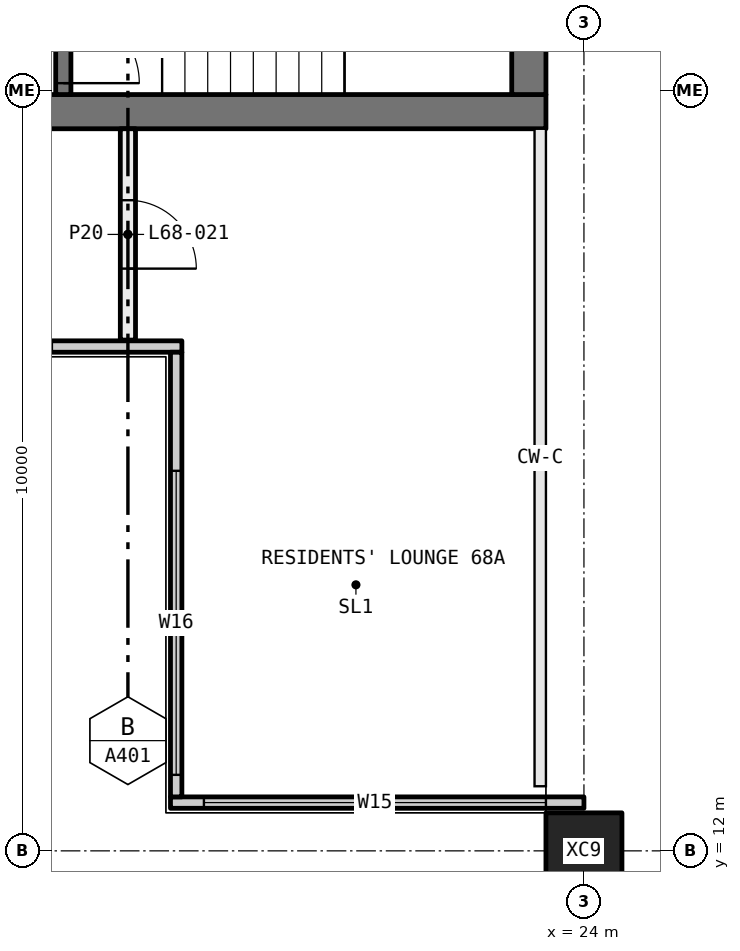
"""IFC4 building model, lengths in metres.
Left out: names, types, materials, properties, quantities, classifications, styles, units other than length and angle.
Written with IfcOpenShell. Run it as: python <this file> out.ifc"""

import sys

from ifc_helpers import new_model, si_unit, direction, frame, frame_2d, origin, origin_2d, place, context, subcontext, project, spatial, rectangle, hollow_rectangle, extrude, element, fill, save


model = new_model("IFC4")
c1 = context("Model", 3, precision=1e-05, world=origin(), true_north=direction((0.0, 1.0)))
c2 = subcontext(c1, "Body", "Model", "MODEL_VIEW")
j1 = project(units=[si_unit("LENGTHUNIT", "METRE"), si_unit("PLANEANGLEUNIT", "RADIAN")], contexts=[c1])
p1 = place(None, origin())
s1 = spatial("IfcSite", under=j1, at=p1, CompositionType="ELEMENT")
p2 = place(p1, origin())
s2 = spatial("IfcBuilding", under=s1, at=p2, CompositionType="ELEMENT")
p3 = place(p2, frame((0.0, 0.0, 252.45)))
s3 = spatial("IfcBuildingStorey", under=s2, at=p3, CompositionType="ELEMENT", Elevation=252.45)
p4 = place(p3, frame((24.0, 12.0, -0.4), z_axis=(0.0, 0.0, 1.0), x_axis=(1.0, 0.0, 0.0)))
e1 = element("IfcColumn", 1, at=p4, inside=s3, PredefinedType="COLUMN", context=c2, shape_type="SweptSolid", body=[
    extrude(hollow_rectangle(XDim=1.0, YDim=1.0, WallThickness=0.036, at=origin_2d()), origin(), (0.0, 0.0, 1.0), 3.45),
])
p5 = place(p3, frame((18.56, 12.635, 0.0), z_axis=(0.0, 0.0, 1.0), x_axis=(1.0, 0.0, 0.0)))
e2 = element("IfcWall", 2, at=p5, inside=s3, PredefinedType="ELEMENTEDWALL", context=c2, shape_type="SweptSolid", body=[
    extrude(rectangle(XDim=5.44, YDim=0.15, at=frame_2d((2.72, 0.0))), origin(), (0.0, 0.0, 1.0), 3.05),
])
p6 = place(p5, frame((0.44, 0.0, 0.45)))
e3 = element("IfcOpeningElement", 3, at=p6, cuts=e2, PredefinedType="OPENING", context=c2, shape_type="SweptSolid", body=[
    extrude(rectangle(XDim=4.5, YDim=2.55, at=frame_2d((2.25, 1.275))), frame((0.0, 0.085, 0.0), z_axis=(0.0, -1.0, 0.0), x_axis=(1.0, 0.0, 0.0)), (0.0, 0.0, 1.0), 0.17),
])
p7 = place(p3, frame((12.56, 18.635, 0.0), z_axis=(0.0, 0.0, 1.0), x_axis=(1.0, 0.0, 0.0)))
e4 = element("IfcWall", 4, at=p7, inside=s3, PredefinedType="ELEMENTEDWALL", context=c2, shape_type="SweptSolid", body=[
    extrude(rectangle(XDim=6.15, YDim=0.15, at=frame_2d((3.075, 0.0))), origin(), (0.0, 0.0, 1.0), 3.05),
])
p8 = place(p7, frame((0.44, 0.0, 0.45)))
e5 = element("IfcOpeningElement", 5, at=p8, cuts=e4, PredefinedType="OPENING", context=c2, shape_type="SweptSolid", body=[
    extrude(rectangle(XDim=4.0, YDim=2.55, at=frame_2d((2.0, 1.275))), frame((0.0, 0.085, 0.0), z_axis=(0.0, -1.0, 0.0), x_axis=(1.0, 0.0, 0.0)), (0.0, 0.0, 1.0), 0.17),
])
p9 = place(p3, frame((18.635, 12.71, 0.0), z_axis=(0.0, 0.0, 1.0), x_axis=(0.0, 1.0, 0.0)))
e6 = element("IfcWall", 6, at=p9, inside=s3, PredefinedType="ELEMENTEDWALL", context=c2, shape_type="SweptSolid", body=[
    extrude(rectangle(XDim=5.85, YDim=0.15, at=frame_2d((2.925, 0.0))), origin(), (0.0, 0.0, 1.0), 3.05),
])
p10 = place(p9, frame((0.29, 0.0, 0.45)))
e7 = element("IfcOpeningElement", 7, at=p10, cuts=e6, PredefinedType="OPENING", context=c2, shape_type="SweptSolid", body=[
    extrude(rectangle(XDim=4.0, YDim=2.55, at=frame_2d((2.0, 1.275))), frame((0.0, 0.085, 0.0), z_axis=(0.0, -1.0, 0.0), x_axis=(1.0, 0.0, 0.0)), (0.0, 0.0, 1.0), 0.17),
])
p11 = place(p3, frame((18.0, 21.5, 0.0), z_axis=(0.0, 0.0, 1.0), x_axis=(0.0, -1.0, 0.0)))
e8 = element("IfcWall", 8, at=p11, inside=s3, PredefinedType="PARTITIONING", context=c2, shape_type="SweptSolid", body=[
    extrude(rectangle(XDim=2.78, YDim=0.2, at=frame_2d((1.39, 0.0))), origin(), (0.0, 0.0, 1.0), 3.05),
])
p12 = place(p11, frame((0.94, 0.0, 0.0)))
e9 = element("IfcOpeningElement", 9, at=p12, cuts=e8, PredefinedType="OPENING", context=c2, shape_type="SweptSolid", body=[
    extrude(rectangle(XDim=0.9, YDim=2.1, at=frame_2d((0.45, 1.05))), frame((0.0, 0.11, 0.0), z_axis=(0.0, -1.0, 0.0), x_axis=(1.0, 0.0, 0.0)), (0.0, 0.0, 1.0), 0.22),
])
p13 = place(p3, frame((12.5, 21.725, 0.0), z_axis=(0.0, 0.0, 1.0), x_axis=(1.0, 0.0, 0.0)))
e10 = element("IfcWall", 10, at=p13, inside=s3, PredefinedType="SHEAR", context=c2, shape_type="SweptSolid", body=[
    extrude(rectangle(XDim=11.0, YDim=0.45, at=frame_2d((5.5, 0.0))), origin(), (0.0, 0.0, 1.0), 3.05),
])
p14 = place(p13, frame((1.125, 0.0, 0.0)))
e11 = element("IfcOpeningElement", 11, at=p14, cuts=e10, PredefinedType="OPENING", context=c2, shape_type="SweptSolid", body=[
    extrude(rectangle(XDim=1.0, YDim=2.1, at=frame_2d((0.5, 1.05))), frame((0.0, 0.235, 0.0), z_axis=(0.0, -1.0, 0.0), x_axis=(1.0, 0.0, 0.0)), (0.0, 0.0, 1.0), 0.47),
])
p15 = place(p3, frame((23.275, 21.95, 0.0), z_axis=(0.0, 0.0, 1.0), x_axis=(0.0, 1.0, 0.0)))
e12 = element("IfcWall", 12, at=p15, inside=s3, PredefinedType="SHEAR", context=c2, shape_type="SweptSolid", body=[
    extrude(rectangle(XDim=16.1, YDim=0.45, at=frame_2d((8.05, 0.0))), origin(), (0.0, 0.0, 1.0), 3.05),
])
p16 = place(p3, frame((17.15, 21.95, 0.0), z_axis=(0.0, 0.0, 1.0), x_axis=(0.0, 1.0, 0.0)))
e13 = element("IfcWall", 13, at=p16, inside=s3, PredefinedType="SOLIDWALL", context=c2, shape_type="SweptSolid", body=[
    extrude(rectangle(XDim=2.95, YDim=0.2, at=frame_2d((1.475, 0.0))), origin(), (0.0, 0.0, 1.0), 3.05),
])
p17 = place(p16, frame((0.15, 0.0, 0.0)))
e14 = element("IfcOpeningElement", 14, at=p17, cuts=e13, PredefinedType="OPENING", context=c2, shape_type="SweptSolid", body=[
    extrude(rectangle(XDim=1.0, YDim=2.1, at=frame_2d((0.5, 1.05))), frame((0.0, 0.11, 0.0), z_axis=(0.0, -1.0, 0.0), x_axis=(1.0, 0.0, 0.0)), (0.0, 0.0, 1.0), 0.22),
])
p18 = place(p6, origin())
e15 = element("IfcWindow", 15, at=p18, inside=s3, PartitioningType="SINGLE_PANEL", PredefinedType="WINDOW", context=c2, shape_type="SweptSolid", body=[
    extrude(rectangle(XDim=4.5, YDim=2.55, at=frame_2d((2.25, 1.275))), frame((0.0, 0.03, 0.0), z_axis=(0.0, -1.0, 0.0), x_axis=(1.0, 0.0, 0.0)), (0.0, 0.0, 1.0), 0.06),
])
fill(e3, e15)
p19 = place(p10, origin())
e16 = element("IfcWindow", 16, at=p19, inside=s3, PartitioningType="SINGLE_PANEL", PredefinedType="WINDOW", context=c2, shape_type="SweptSolid", body=[
    extrude(rectangle(XDim=4.0, YDim=2.55, at=frame_2d((2.0, 1.275))), frame((0.0, 0.03, 0.0), z_axis=(0.0, -1.0, 0.0), x_axis=(1.0, 0.0, 0.0)), (0.0, 0.0, 1.0), 0.06),
])
fill(e7, e16)
p20 = place(p12, origin())
e17 = element("IfcDoor", 17, at=p20, inside=s3, OperationType="SINGLE_SWING_LEFT", PredefinedType="DOOR", context=c2, shape_type="SweptSolid", body=[
    extrude(rectangle(XDim=0.9, YDim=2.1, at=frame_2d((0.45, 1.05))), frame((0.0, 0.025, 0.0), z_axis=(0.0, -1.0, 0.0), x_axis=(1.0, 0.0, 0.0)), (0.0, 0.0, 1.0), 0.05),
])
fill(e9, e17)
p21 = place(p17, frame((1.0, 0.0, 0.0), x_axis=(-1.0, 0.0, 0.0)))
e18 = element("IfcDoor", 18, at=p21, inside=s3, OperationType="SINGLE_SWING_LEFT", PredefinedType="DOOR", context=c2, shape_type="SweptSolid", body=[
    extrude(rectangle(XDim=1.0, YDim=2.1, at=frame_2d((0.5, 1.05))), frame((0.0, 0.025, 0.0), z_axis=(0.0, -1.0, 0.0), x_axis=(1.0, 0.0, 0.0)), (0.0, 0.0, 1.0), 0.05),
])
fill(e14, e18)
save(model, sys.argv[1])
